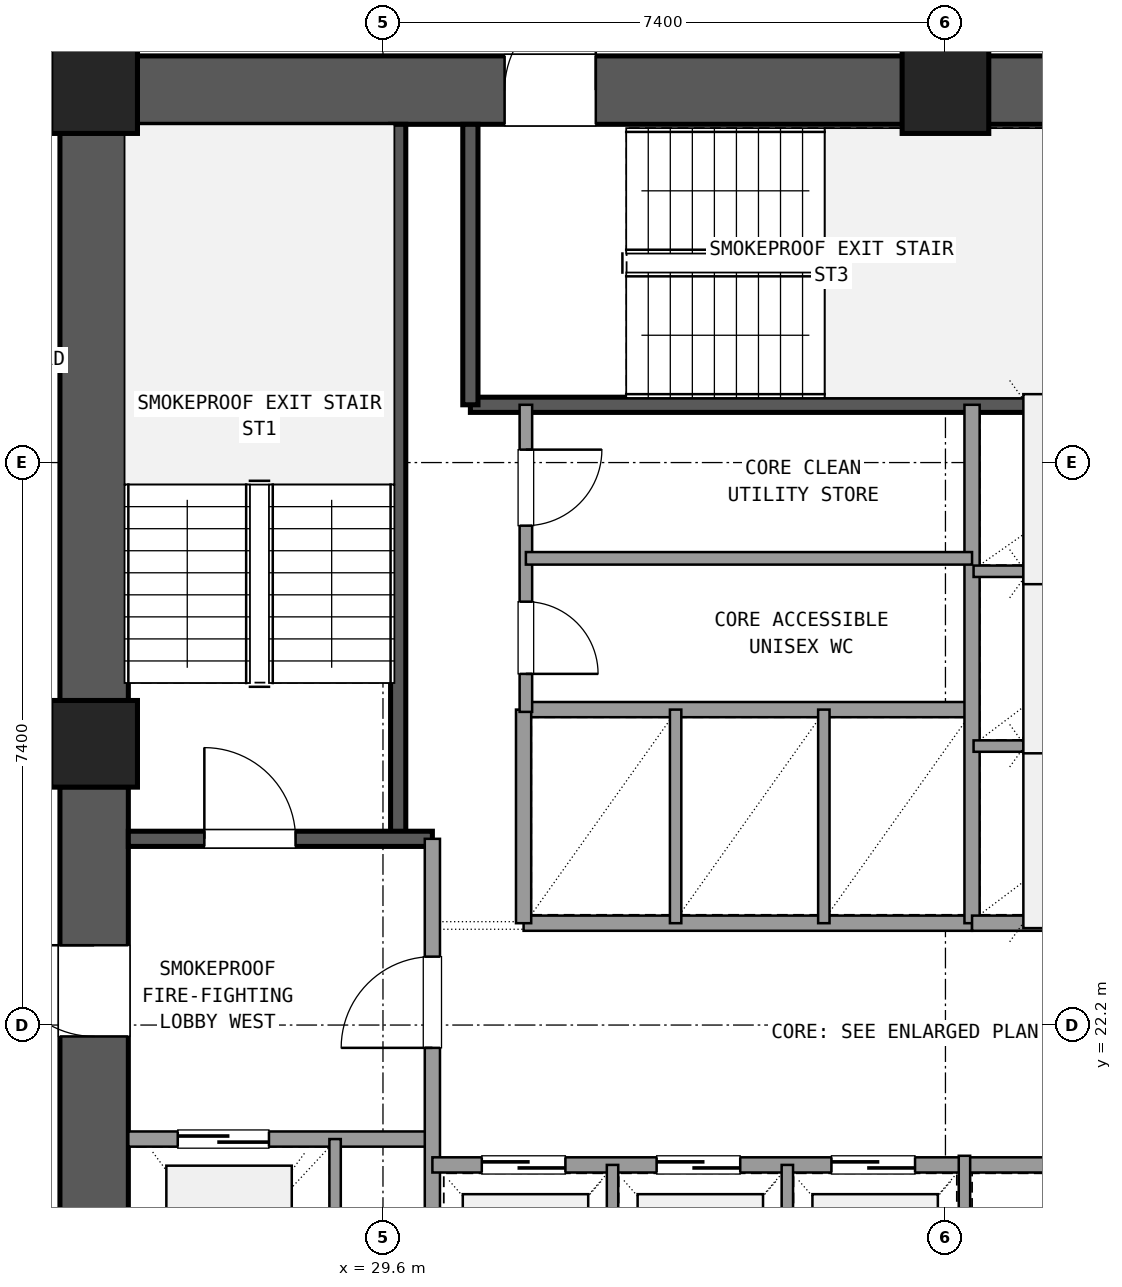
"""IFC4 building model, lengths in metres.
Left out: names, types, materials, properties, quantities, classifications, styles, units other than length and angle.
Written with IfcOpenShell. Run it as: python <this file> out.ifc"""

import sys

from ifc_helpers import new_model, si_unit, direction, frame, frame_2d, origin, origin_2d, place, context, subcontext, project, spatial, rectangle, extrude, element, fill, save


model = new_model("IFC4")
c1 = context("Model", 3, precision=1e-05, world=origin(), true_north=direction((0.0, 1.0)))
c2 = subcontext(c1, "Body", "Model", "MODEL_VIEW")
j1 = project(units=[si_unit("LENGTHUNIT", "METRE"), si_unit("PLANEANGLEUNIT", "RADIAN")], contexts=[c1])
p1 = place(None, origin())
s1 = spatial("IfcSite", under=j1, at=p1, CompositionType="ELEMENT")
p2 = place(p1, origin())
s2 = spatial("IfcBuilding", under=s1, at=p2, CompositionType="ELEMENT")
p3 = place(p2, frame((0.0, 0.0, 67.14)))
s3 = spatial("IfcBuildingStorey", under=s2, at=p3, CompositionType="ELEMENT", Elevation=67.14)
for number, where, z_axis, x_axis in (
    (1, (37.0, 34.5, 0.0), (0.0, 0.0, 1.0), (1.0, 0.0, 0.0)),
    (2, (25.8, 34.5, 0.0), (0.0, 0.0, 1.0), (1.0, 0.0, 0.0)),
    (3, (25.8, 25.9, 0.0), (0.0, 0.0, 1.0), (1.0, 0.0, 0.0)),
):
    element("IfcColumn", number, at=place(p3, frame(where, z_axis=z_axis, x_axis=x_axis)), inside=s3, PredefinedType="COLUMN", context=c2, shape_type="SweptSolid", body=[
        extrude(rectangle(XDim=1.14, YDim=1.14, at=origin_2d()), origin(), (0.0, 0.0, 1.0), 3.6),
    ])
p4 = place(p3, frame((47.635, 34.5, 0.0), z_axis=(0.0, 0.0, 1.0), x_axis=(-1.0, 0.0, 0.0)))
e4 = element("IfcWall", 4, at=p4, inside=s3, PredefinedType="SHEAR", context=c2, shape_type="SweptSolid", body=[
    extrude(rectangle(XDim=10.07, YDim=0.9, at=frame_2d((5.035, 0.0))), origin(), (0.0, 0.0, 1.0), 3.3),
])
p5 = place(p4, frame((4.535, 0.0, 0.0)))
e5 = element("IfcOpeningElement", 5, at=p5, cuts=e4, PredefinedType="OPENING", context=c2, shape_type="SweptSolid", body=[
    extrude(rectangle(XDim=1.6, YDim=2.2, at=frame_2d((0.8, 1.1))), frame((0.0, 0.46, 0.0), z_axis=(0.0, -1.0, 0.0), x_axis=(1.0, 0.0, 0.0)), (0.0, 0.0, 1.0), 0.92),
])
p6 = place(p3, frame((36.435, 34.5, 0.0), z_axis=(0.0, 0.0, 1.0), x_axis=(-1.0, 0.0, 0.0)))
e6 = element("IfcWall", 6, at=p6, inside=s3, PredefinedType="SHEAR", context=c2, shape_type="SweptSolid", body=[
    extrude(rectangle(XDim=10.07, YDim=0.9, at=frame_2d((5.035, 0.0))), origin(), (0.0, 0.0, 1.0), 3.3),
])
p7 = place(p6, frame((4.035, 0.0, 0.0)))
e7 = element("IfcOpeningElement", 7, at=p7, cuts=e6, PredefinedType="OPENING", context=c2, shape_type="SweptSolid", body=[
    extrude(rectangle(XDim=1.2, YDim=2.15, at=frame_2d((0.6, 1.075))), frame((0.0, 0.46, 0.0), z_axis=(0.0, -1.0, 0.0), x_axis=(1.0, 0.0, 0.0)), (0.0, 0.0, 1.0), 0.92),
])
p8 = place(p3, frame((25.8, 33.935, 0.0), z_axis=(0.0, 0.0, 1.0), x_axis=(0.0, -1.0, 0.0)))
e8 = element("IfcWall", 8, at=p8, inside=s3, PredefinedType="SHEAR", context=c2, shape_type="SweptSolid", body=[
    extrude(rectangle(XDim=7.47, YDim=0.9, at=frame_2d((3.735, 0.0))), origin(), (0.0, 0.0, 1.0), 3.3),
])
p9 = place(p3, frame((25.8, 25.335, 0.0), z_axis=(0.0, 0.0, 1.0), x_axis=(0.0, -1.0, 0.0)))
e9 = element("IfcWall", 9, at=p9, inside=s3, PredefinedType="SHEAR", context=c2, shape_type="SweptSolid", body=[
    extrude(rectangle(XDim=7.47, YDim=0.9, at=frame_2d((3.735, 0.0))), origin(), (0.0, 0.0, 1.0), 3.3),
])
p10 = place(p9, frame((2.085, 0.0, 0.0)))
e10 = element("IfcOpeningElement", 10, at=p10, cuts=e9, PredefinedType="OPENING", context=c2, shape_type="SweptSolid", body=[
    extrude(rectangle(XDim=1.2, YDim=2.15, at=frame_2d((0.6, 1.075))), frame((0.0, 0.46, 0.0), z_axis=(0.0, -1.0, 0.0), x_axis=(1.0, 0.0, 0.0)), (0.0, 0.0, 1.0), 0.92),
])
p11 = place(p3, frame((29.8, 24.65, 0.0), z_axis=(0.0, 0.0, 1.0), x_axis=(0.0, 1.0, 0.0)))
e11 = element("IfcWall", 11, at=p11, inside=s3, PredefinedType="SHEAR", context=c2, shape_type="SweptSolid", body=[
    extrude(rectangle(XDim=9.4, YDim=0.2, at=frame_2d((4.7, 0.0))), origin(), (0.0, 0.0, 1.0), 3.3),
])
p12 = place(p3, frame((26.25, 24.65, 0.0), z_axis=(0.0, 0.0, 1.0), x_axis=(1.0, 0.0, 0.0)))
e12 = element("IfcWall", 12, at=p12, inside=s3, PredefinedType="SHEAR", context=c2, shape_type="SweptSolid", body=[
    extrude(rectangle(XDim=4.0, YDim=0.2, at=frame_2d((2.0, 0.0))), origin(), (0.0, 0.0, 1.0), 3.3),
])
p13 = place(p12, frame((1.0, 0.0, 0.0)))
e13 = element("IfcOpeningElement", 13, at=p13, cuts=e12, PredefinedType="OPENING", context=c2, shape_type="SweptSolid", body=[
    extrude(rectangle(XDim=1.2, YDim=2.15, at=frame_2d((0.6, 1.075))), frame((0.0, 0.11, 0.0), z_axis=(0.0, -1.0, 0.0), x_axis=(1.0, 0.0, 0.0)), (0.0, 0.0, 1.0), 0.22),
])
p14 = place(p3, frame((30.75, 30.36, 0.0), z_axis=(0.0, 0.0, 1.0), x_axis=(1.0, 0.0, 0.0)))
e14 = element("IfcWall", 14, at=p14, inside=s3, PredefinedType="SHEAR", context=c2, shape_type="SweptSolid", body=[
    extrude(rectangle(XDim=9.5, YDim=0.2, at=frame_2d((4.75, 0.0))), origin(), (0.0, 0.0, 1.0), 3.3),
])
p15 = place(p3, frame((30.75, 30.36, 0.0), z_axis=(0.0, 0.0, 1.0), x_axis=(0.0, 1.0, 0.0)))
e15 = element("IfcWall", 15, at=p15, inside=s3, PredefinedType="SHEAR", context=c2, shape_type="SweptSolid", body=[
    extrude(rectangle(XDim=3.69, YDim=0.2, at=frame_2d((1.845, 0.0))), origin(), (0.0, 0.0, 1.0), 3.3),
])
p16 = place(p3, frame((26.25, 20.7, 0.0), z_axis=(0.0, 0.0, 1.0), x_axis=(1.0, 0.0, 0.0)))
e16 = element("IfcWall", 16, at=p16, inside=s3, PredefinedType="SOLIDWALL", context=c2, shape_type="SweptSolid", body=[
    extrude(rectangle(XDim=4.0, YDim=0.2, at=frame_2d((2.0, 0.0))), origin(), (0.0, 0.0, 1.0), 2.59),
])
p17 = place(p16, frame((0.65, 0.0, 0.0)))
e17 = element("IfcOpeningElement", 17, at=p17, cuts=e16, PredefinedType="OPENING", context=c2, shape_type="SweptSolid", body=[
    extrude(rectangle(XDim=1.2, YDim=2.15, at=frame_2d((0.6, 1.075))), frame((0.0, 0.11, 0.0), z_axis=(0.0, -1.0, 0.0), x_axis=(1.0, 0.0, 0.0)), (0.0, 0.0, 1.0), 0.22),
])
p18 = place(p3, frame((30.25, 17.75, 0.0), z_axis=(0.0, 0.0, 1.0), x_axis=(0.0, 1.0, 0.0)))
e18 = element("IfcWall", 18, at=p18, inside=s3, PredefinedType="SOLIDWALL", context=c2, shape_type="SweptSolid", body=[
    extrude(rectangle(XDim=6.9, YDim=0.2, at=frame_2d((3.45, 0.0))), origin(), (0.0, 0.0, 1.0), 2.59),
])
p19 = place(p18, frame((4.15, 0.0, 0.0)))
e19 = element("IfcOpeningElement", 19, at=p19, cuts=e18, PredefinedType="OPENING", context=c2, shape_type="SweptSolid", body=[
    extrude(rectangle(XDim=1.2, YDim=2.15, at=frame_2d((0.6, 1.075))), frame((0.0, 0.11, 0.0), z_axis=(0.0, -1.0, 0.0), x_axis=(1.0, 0.0, 0.0)), (0.0, 0.0, 1.0), 0.22),
])
p20 = place(p3, frame((28.97, 17.75, 0.0), z_axis=(0.0, 0.0, 1.0), x_axis=(0.0, 1.0, 0.0)))
e20 = element("IfcWall", 20, at=p20, inside=s3, PredefinedType="PARTITIONING", context=c2, shape_type="SweptSolid", body=[
    extrude(rectangle(XDim=2.95, YDim=0.15, at=frame_2d((1.475, 0.0))), origin(), (0.0, 0.0, 1.0), 2.59),
])
p21 = place(p3, frame((30.25, 20.36, 0.0), z_axis=(0.0, 0.0, 1.0), x_axis=(1.0, 0.0, 0.0)))
e21 = element("IfcWall", 21, at=p21, inside=s3, PredefinedType="SOLIDWALL", context=c2, shape_type="SweptSolid", body=[
    extrude(rectangle(XDim=7.0, YDim=0.2, at=frame_2d((3.5, 0.0))), origin(), (0.0, 0.0, 1.0), 2.59),
])
p22 = place(p21, frame((0.65, 0.0, 0.0)))
e22 = element("IfcOpeningElement", 22, at=p22, cuts=e21, PredefinedType="OPENING", context=c2, shape_type="SweptSolid", body=[
    extrude(rectangle(XDim=1.1, YDim=2.15, at=frame_2d((0.55, 1.075))), frame((0.0, 0.11, 0.0), z_axis=(0.0, -1.0, 0.0), x_axis=(1.0, 0.0, 0.0)), (0.0, 0.0, 1.0), 0.22),
])
p23 = place(p21, frame((2.95, 0.0, 0.0)))
e23 = element("IfcOpeningElement", 23, at=p23, cuts=e21, PredefinedType="OPENING", context=c2, shape_type="SweptSolid", body=[
    extrude(rectangle(XDim=1.1, YDim=2.15, at=frame_2d((0.55, 1.075))), frame((0.0, 0.11, 0.0), z_axis=(0.0, -1.0, 0.0), x_axis=(1.0, 0.0, 0.0)), (0.0, 0.0, 1.0), 0.22),
])
p24 = place(p21, frame((5.25, 0.0, 0.0)))
e24 = element("IfcOpeningElement", 24, at=p24, cuts=e21, PredefinedType="OPENING", context=c2, shape_type="SweptSolid", body=[
    extrude(rectangle(XDim=1.1, YDim=2.15, at=frame_2d((0.55, 1.075))), frame((0.0, 0.11, 0.0), z_axis=(0.0, -1.0, 0.0), x_axis=(1.0, 0.0, 0.0)), (0.0, 0.0, 1.0), 0.22),
])
for number, where, z_axis, x_axis in (
    (25, (32.62, 17.75, 0.0), (0.0, 0.0, 1.0), (0.0, 1.0, 0.0)),
    (26, (34.92, 17.75, 0.0), (0.0, 0.0, 1.0), (0.0, 1.0, 0.0)),
):
    element("IfcWall", number, at=place(p3, frame(where, z_axis=z_axis, x_axis=x_axis)), inside=s3, PredefinedType="PARTITIONING", context=c2, shape_type="SweptSolid", body=[
        extrude(rectangle(XDim=2.61, YDim=0.15, at=frame_2d((1.305, 0.0))), origin(), (0.0, 0.0, 1.0), 2.59),
    ])
p25 = place(p3, frame((37.25, 20.36, 0.0), z_axis=(0.0, 0.0, 1.0), x_axis=(1.0, 0.0, 0.0)))
e27 = element("IfcWall", 27, at=p25, inside=s3, PredefinedType="SOLIDWALL", context=c2, shape_type="SweptSolid", body=[
    extrude(rectangle(XDim=6.1, YDim=0.2, at=frame_2d((3.05, 0.0))), origin(), (0.0, 0.0, 1.0), 2.59),
])
p26 = place(p3, frame((37.25, 17.75, 0.0), z_axis=(0.0, 0.0, 1.0), x_axis=(0.0, 1.0, 0.0)))
e28 = element("IfcWall", 28, at=p26, inside=s3, PredefinedType="PARTITIONING", context=c2, shape_type="SweptSolid", body=[
    extrude(rectangle(XDim=2.73, YDim=0.15, at=frame_2d((1.365, 0.0))), origin(), (0.0, 0.0, 1.0), 2.59),
])
for number, where, z_axis, x_axis in (
    (29, (31.45, 23.54, 0.0), (0.0, 0.0, 1.0), (1.0, 0.0, 0.0)),
    (30, (31.45, 26.35, 0.0), (0.0, 0.0, 1.0), (1.0, 0.0, 0.0)),
):
    element("IfcWall", number, at=place(p3, frame(where, z_axis=z_axis, x_axis=x_axis)), inside=s3, PredefinedType="SOLIDWALL", context=c2, shape_type="SweptSolid", body=[
        extrude(rectangle(XDim=5.9, YDim=0.2, at=frame_2d((2.95, 0.0))), origin(), (0.0, 0.0, 1.0), 2.59),
    ])
p27 = place(p3, frame((31.45, 23.54, 0.0), z_axis=(0.0, 0.0, 1.0), x_axis=(0.0, 1.0, 0.0)))
e31 = element("IfcWall", 31, at=p27, inside=s3, PredefinedType="SOLIDWALL", context=c2, shape_type="SweptSolid", body=[
    extrude(rectangle(XDim=2.81, YDim=0.2, at=frame_2d((1.405, 0.0))), origin(), (0.0, 0.0, 1.0), 2.59),
])
for number, where, z_axis, x_axis in (
    (32, (33.45, 23.54, 0.0), (0.0, 0.0, 1.0), (0.0, 1.0, 0.0)),
    (33, (35.4, 23.54, 0.0), (0.0, 0.0, 1.0), (0.0, 1.0, 0.0)),
):
    element("IfcWall", number, at=place(p3, frame(where, z_axis=z_axis, x_axis=x_axis)), inside=s3, PredefinedType="PARTITIONING", context=c2, shape_type="SweptSolid", body=[
        extrude(rectangle(XDim=2.81, YDim=0.15, at=frame_2d((1.405, 0.0))), origin(), (0.0, 0.0, 1.0), 2.59),
    ])
p28 = place(p3, frame((37.35, 23.54, 0.0), z_axis=(0.0, 0.0, 1.0), x_axis=(0.0, 1.0, 0.0)))
e34 = element("IfcWall", 34, at=p28, inside=s3, PredefinedType="SOLIDWALL", context=c2, shape_type="SweptSolid", body=[
    extrude(rectangle(XDim=6.82, YDim=0.2, at=frame_2d((3.41, 0.0))), origin(), (0.0, 0.0, 1.0), 2.59),
])
p29 = place(p3, frame((37.35, 23.54, 0.0), z_axis=(0.0, 0.0, 1.0), x_axis=(1.0, 0.0, 0.0)))
e35 = element("IfcWall", 35, at=p29, inside=s3, PredefinedType="SOLIDWALL", context=c2, shape_type="SweptSolid", body=[
    extrude(rectangle(XDim=3.05, YDim=0.2, at=frame_2d((1.525, 0.0))), origin(), (0.0, 0.0, 1.0), 2.59),
])
for number, where, z_axis, x_axis in (
    (36, (37.37, 25.87, 0.0), (0.0, 0.0, 1.0), (1.0, 0.0, 0.0)),
    (37, (37.37, 28.17, 0.0), (0.0, 0.0, 1.0), (1.0, 0.0, 0.0)),
):
    element("IfcWall", number, at=place(p3, frame(where, z_axis=z_axis, x_axis=x_axis)), inside=s3, PredefinedType="PARTITIONING", context=c2, shape_type="SweptSolid", body=[
        extrude(rectangle(XDim=3.01, YDim=0.15, at=frame_2d((1.505, 0.0))), origin(), (0.0, 0.0, 1.0), 2.59),
    ])
p30 = place(p3, frame((31.48, 26.32, 0.0), z_axis=(0.0, 0.0, 1.0), x_axis=(0.0, 1.0, 0.0)))
e38 = element("IfcWall", 38, at=p30, inside=s3, PredefinedType="PLUMBINGWALL", context=c2, shape_type="SweptSolid", body=[
    extrude(rectangle(XDim=4.04, YDim=0.165, at=frame_2d((2.02, 0.0))), origin(), (0.0, 0.0, 1.0), 2.59),
])
p31 = place(p30, frame((0.5, 0.0, 0.0)))
e39 = element("IfcOpeningElement", 39, at=p31, cuts=e38, PredefinedType="OPENING", context=c2, shape_type="SweptSolid", body=[
    extrude(rectangle(XDim=0.95, YDim=2.1, at=frame_2d((0.475, 1.05))), frame((0.0, 0.093, 0.0), z_axis=(0.0, -1.0, 0.0), x_axis=(1.0, 0.0, 0.0)), (0.0, 0.0, 1.0), 0.185),
])
p32 = place(p30, frame((2.45, 0.0, 0.0)))
e40 = element("IfcOpeningElement", 40, at=p32, cuts=e38, PredefinedType="OPENING", context=c2, shape_type="SweptSolid", body=[
    extrude(rectangle(XDim=1.0, YDim=2.15, at=frame_2d((0.5, 1.075))), frame((0.0, 0.093, 0.0), z_axis=(0.0, -1.0, 0.0), x_axis=(1.0, 0.0, 0.0)), (0.0, 0.0, 1.0), 0.185),
])
p33 = place(p3, frame((31.48, 28.34, 0.0), z_axis=(0.0, 0.0, 1.0), x_axis=(1.0, 0.0, 0.0)))
e41 = element("IfcWall", 41, at=p33, inside=s3, PredefinedType="PLUMBINGWALL", context=c2, shape_type="SweptSolid", body=[
    extrude(rectangle(XDim=5.87, YDim=0.165, at=frame_2d((2.935, 0.0))), origin(), (0.0, 0.0, 1.0), 2.59),
])
p34 = place(p3, frame((37.0, 34.95, 0.0), z_axis=(0.0, 0.0, 1.0), x_axis=(0.0, 1.0, 0.0)))
e42 = element("IfcWall", 42, at=p34, inside=s3, PredefinedType="PARTITIONING", context=c2, shape_type="SweptSolid", body=[
    extrude(rectangle(XDim=2.7, YDim=0.18, at=frame_2d((1.35, 0.0))), origin(), (0.0, 0.0, 1.0), 2.59),
])
p35 = place(p34, frame((0.35, 0.0, 0.0)))
e43 = element("IfcOpeningElement", 43, at=p35, cuts=e42, PredefinedType="OPENING", context=c2, shape_type="SweptSolid", body=[
    extrude(rectangle(XDim=2.0, YDim=2.2, at=frame_2d((1.0, 1.1))), frame((0.0, 0.1, 0.0), z_axis=(0.0, -1.0, 0.0), x_axis=(1.0, 0.0, 0.0)), (0.0, 0.0, 1.0), 0.2),
])
p36 = place(p13, origin())
e44 = element("IfcDoor", 44, at=p36, inside=s3, OperationType="SINGLE_SWING_LEFT", PredefinedType="DOOR", context=c2, shape_type="SweptSolid", body=[
    extrude(rectangle(XDim=1.2, YDim=2.15, at=frame_2d((0.6, 1.075))), frame((0.0, 0.025, 0.0), z_axis=(0.0, -1.0, 0.0), x_axis=(1.0, 0.0, 0.0)), (0.0, 0.0, 1.0), 0.05),
])
fill(e13, e44)
p37 = place(p17, origin())
e45 = element("IfcDoor", 45, at=p37, inside=s3, OperationType="SLIDING_TO_LEFT", PredefinedType="DOOR", context=c2, shape_type="SweptSolid", body=[
    extrude(rectangle(XDim=1.2, YDim=2.15, at=frame_2d((0.6, 1.075))), frame((0.0, 0.025, 0.0), z_axis=(0.0, -1.0, 0.0), x_axis=(1.0, 0.0, 0.0)), (0.0, 0.0, 1.0), 0.05),
])
fill(e17, e45)
p38 = place(p19, origin())
e46 = element("IfcDoor", 46, at=p38, inside=s3, OperationType="SINGLE_SWING_LEFT", PredefinedType="DOOR", context=c2, shape_type="SweptSolid", body=[
    extrude(rectangle(XDim=1.2, YDim=2.15, at=frame_2d((0.6, 1.075))), frame((0.0, 0.025, 0.0), z_axis=(0.0, -1.0, 0.0), x_axis=(1.0, 0.0, 0.0)), (0.0, 0.0, 1.0), 0.05),
])
fill(e19, e46)
p39 = place(p10, frame((1.2, 0.0, 0.0), z_axis=(0.0, 0.0, 1.0), x_axis=(-1.0, 0.0, 0.0)))
e47 = element("IfcDoor", 47, at=p39, inside=s3, OperationType="SINGLE_SWING_LEFT", PredefinedType="DOOR", context=c2, shape_type="SweptSolid", body=[
    extrude(rectangle(XDim=1.2, YDim=2.15, at=frame_2d((0.6, 1.075))), frame((0.0, 0.025, 0.0), z_axis=(0.0, -1.0, 0.0), x_axis=(1.0, 0.0, 0.0)), (0.0, 0.0, 1.0), 0.05),
])
fill(e10, e47)
p40 = place(p7, frame((1.2, 0.0, 0.0), z_axis=(0.0, 0.0, 1.0), x_axis=(-1.0, 0.0, 0.0)))
e48 = element("IfcDoor", 48, at=p40, inside=s3, OperationType="SINGLE_SWING_LEFT", PredefinedType="DOOR", context=c2, shape_type="SweptSolid", body=[
    extrude(rectangle(XDim=1.2, YDim=2.15, at=frame_2d((0.6, 1.075))), frame((0.0, 0.025, 0.0), z_axis=(0.0, -1.0, 0.0), x_axis=(1.0, 0.0, 0.0)), (0.0, 0.0, 1.0), 0.05),
])
fill(e7, e48)
p41 = place(p22, origin())
e49 = element("IfcDoor", 49, at=p41, inside=s3, OperationType="SLIDING_TO_LEFT", PredefinedType="DOOR", context=c2, shape_type="SweptSolid", body=[
    extrude(rectangle(XDim=1.1, YDim=2.15, at=frame_2d((0.55, 1.075))), frame((0.0, 0.025, 0.0), z_axis=(0.0, -1.0, 0.0), x_axis=(1.0, 0.0, 0.0)), (0.0, 0.0, 1.0), 0.05),
])
fill(e22, e49)
p42 = place(p23, origin())
e50 = element("IfcDoor", 50, at=p42, inside=s3, OperationType="SLIDING_TO_LEFT", PredefinedType="DOOR", context=c2, shape_type="SweptSolid", body=[
    extrude(rectangle(XDim=1.1, YDim=2.15, at=frame_2d((0.55, 1.075))), frame((0.0, 0.025, 0.0), z_axis=(0.0, -1.0, 0.0), x_axis=(1.0, 0.0, 0.0)), (0.0, 0.0, 1.0), 0.05),
])
fill(e23, e50)
p43 = place(p24, origin())
e51 = element("IfcDoor", 51, at=p43, inside=s3, OperationType="SLIDING_TO_LEFT", PredefinedType="DOOR", context=c2, shape_type="SweptSolid", body=[
    extrude(rectangle(XDim=1.1, YDim=2.15, at=frame_2d((0.55, 1.075))), frame((0.0, 0.025, 0.0), z_axis=(0.0, -1.0, 0.0), x_axis=(1.0, 0.0, 0.0)), (0.0, 0.0, 1.0), 0.05),
])
fill(e24, e51)
p44 = place(p31, frame((0.95, 0.0, 0.0), z_axis=(0.0, 0.0, 1.0), x_axis=(-1.0, 0.0, 0.0)))
e52 = element("IfcDoor", 52, at=p44, inside=s3, OperationType="SINGLE_SWING_LEFT", PredefinedType="DOOR", context=c2, shape_type="SweptSolid", body=[
    extrude(rectangle(XDim=0.95, YDim=2.1, at=frame_2d((0.475, 1.05))), frame((0.0, 0.025, 0.0), z_axis=(0.0, -1.0, 0.0), x_axis=(1.0, 0.0, 0.0)), (0.0, 0.0, 1.0), 0.05),
])
fill(e39, e52)
p45 = place(p32, frame((1.0, 0.0, 0.0), z_axis=(0.0, 0.0, 1.0), x_axis=(-1.0, 0.0, 0.0)))
e53 = element("IfcDoor", 53, at=p45, inside=s3, OperationType="SINGLE_SWING_RIGHT", PredefinedType="DOOR", context=c2, shape_type="SweptSolid", body=[
    extrude(rectangle(XDim=1.0, YDim=2.15, at=frame_2d((0.5, 1.075))), frame((0.0, 0.025, 0.0), z_axis=(0.0, -1.0, 0.0), x_axis=(1.0, 0.0, 0.0)), (0.0, 0.0, 1.0), 0.05),
])
fill(e40, e53)
save(model, sys.argv[1])
